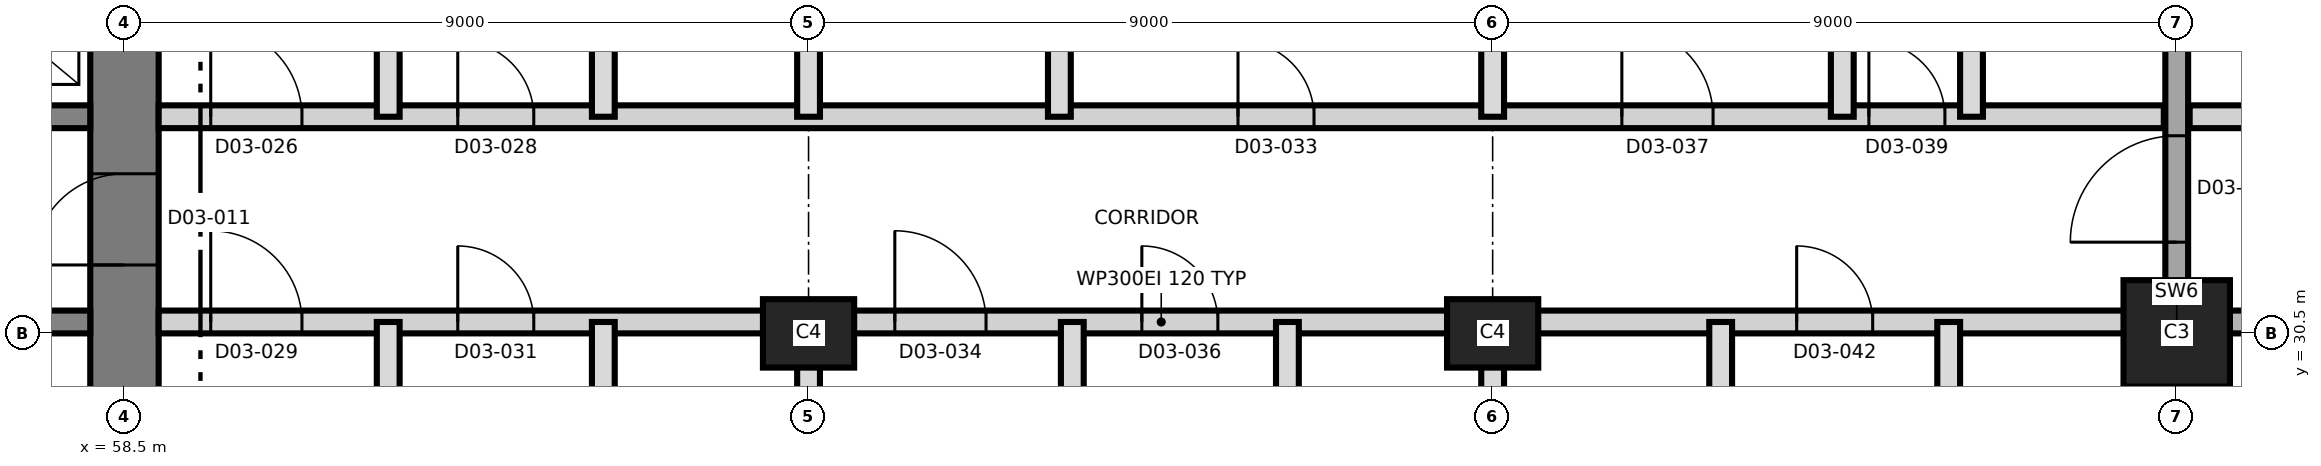
"""IFC4 building model, lengths in metres.
Left out: names, types, materials, properties, quantities, classifications, styles, units other than length and angle.
Written with IfcOpenShell. Run it as: python <this file> out.ifc"""

import sys

from ifc_helpers import new_model, si_unit, direction, frame, frame_2d, origin, origin_2d, place, context, subcontext, project, spatial, rectangle, extrude, element, fill, save


model = new_model("IFC4")
c1 = context("Model", 3, precision=1e-05, world=origin(), true_north=direction((0.0, 1.0)))
c2 = subcontext(c1, "Body", "Model", "MODEL_VIEW")
j1 = project(units=[si_unit("LENGTHUNIT", "METRE"), si_unit("PLANEANGLEUNIT", "RADIAN")], contexts=[c1])
p1 = place(None, origin())
s1 = spatial("IfcSite", under=j1, at=p1, CompositionType="ELEMENT")
p2 = place(p1, origin())
s2 = spatial("IfcBuilding", under=s1, at=p2, CompositionType="ELEMENT")
p3 = place(p2, frame((0.0, 0.0, 59.4)))
s3 = spatial("IfcBuildingStorey", under=s2, at=p3, CompositionType="ELEMENT", Elevation=59.4)
p4 = place(p3, frame((58.5, 21.05, 0.0), z_axis=(0.0, 0.0, 1.0), x_axis=(0.0, 1.0, 0.0)))
e1 = element("IfcWall", 1, at=p4, inside=s3, PredefinedType="SHEAR", context=c2, shape_type="SweptSolid", body=[
    extrude(rectangle(XDim=18.9, YDim=0.9, at=frame_2d((9.45, 0.0))), origin(), (0.0, 0.0, 1.0), 3.7),
])
p5 = place(p4, frame((10.35, 0.0, 0.0)))
e2 = element("IfcOpeningElement", 2, at=p5, cuts=e1, PredefinedType="OPENING", context=c2, shape_type="SweptSolid", body=[
    extrude(rectangle(XDim=1.2, YDim=2.1, at=frame_2d((0.6, 1.05))), frame((0.0, 0.46, 0.0), z_axis=(0.0, -1.0, 0.0), x_axis=(1.0, 0.0, 0.0)), (0.0, 0.0, 1.0), 0.92),
])
p6 = place(p3, frame((31.95, 30.65, 0.0), z_axis=(0.0, 0.0, 1.0), x_axis=(1.0, 0.0, 0.0)))
e3 = element("IfcWall", 3, at=p6, inside=s3, PredefinedType="SHEAR", context=c2, shape_type="SweptSolid", body=[
    extrude(rectangle(XDim=26.1, YDim=0.3, at=frame_2d((13.05, 0.0))), origin(), (0.0, 0.0, 1.0), 3.7),
])
p7 = place(p6, frame((24.55, 0.0, 0.0)))
e4 = element("IfcOpeningElement", 4, at=p7, cuts=e3, PredefinedType="OPENING", context=c2, shape_type="SweptSolid", body=[
    extrude(rectangle(XDim=1.0, YDim=2.1, at=frame_2d((0.5, 1.05))), frame((0.0, 0.16, 0.0), z_axis=(0.0, -1.0, 0.0), x_axis=(1.0, 0.0, 0.0)), (0.0, 0.0, 1.0), 0.32),
])
p8 = place(p6, frame((11.35, 0.0, 0.0)))
e5 = element("IfcOpeningElement", 5, at=p8, cuts=e3, PredefinedType="OPENING", context=c2, shape_type="SweptSolid", body=[
    extrude(rectangle(XDim=1.0, YDim=2.1, at=frame_2d((0.5, 1.05))), frame((0.0, 0.16, 0.0), z_axis=(0.0, -1.0, 0.0), x_axis=(1.0, 0.0, 0.0)), (0.0, 0.0, 1.0), 0.32),
])
p9 = place(p3, frame((31.95, 33.35, 0.0), z_axis=(0.0, 0.0, 1.0), x_axis=(1.0, 0.0, 0.0)))
e6 = element("IfcWall", 6, at=p9, inside=s3, PredefinedType="SHEAR", context=c2, shape_type="SweptSolid", body=[
    extrude(rectangle(XDim=26.1, YDim=0.3, at=frame_2d((13.05, 0.0))), origin(), (0.0, 0.0, 1.0), 3.7),
])
p10 = place(p9, frame((13.125, 0.0, 0.0)))
e7 = element("IfcOpeningElement", 7, at=p10, cuts=e6, PredefinedType="OPENING", context=c2, shape_type="SweptSolid", body=[
    extrude(rectangle(XDim=1.4, YDim=2.1, at=frame_2d((0.7, 1.05))), frame((0.0, 0.16, 0.0), z_axis=(0.0, -1.0, 0.0), x_axis=(1.0, 0.0, 0.0)), (0.0, 0.0, 1.0), 0.32),
])
p11 = place(p9, frame((5.175, 0.0, 0.0)))
e8 = element("IfcOpeningElement", 8, at=p11, cuts=e6, PredefinedType="OPENING", context=c2, shape_type="SweptSolid", body=[
    extrude(rectangle(XDim=1.2, YDim=2.1, at=frame_2d((0.6, 1.05))), frame((0.0, 0.16, 0.0), z_axis=(0.0, -1.0, 0.0), x_axis=(1.0, 0.0, 0.0)), (0.0, 0.0, 1.0), 0.32),
])
p12 = place(p9, frame((19.725, 0.0, 0.0)))
e9 = element("IfcOpeningElement", 9, at=p12, cuts=e6, PredefinedType="OPENING", context=c2, shape_type="SweptSolid", body=[
    extrude(rectangle(XDim=1.2, YDim=2.1, at=frame_2d((0.6, 1.05))), frame((0.0, 0.16, 0.0), z_axis=(0.0, -1.0, 0.0), x_axis=(1.0, 0.0, 0.0)), (0.0, 0.0, 1.0), 0.32),
])
for number, where, z_axis, x_axis in (
    (10, (67.5, 30.5, 0.0), (0.0, 0.0, 1.0), (1.0, 0.0, 0.0)),
    (11, (76.5, 30.5, 0.0), (0.0, 0.0, 1.0), (1.0, 0.0, 0.0)),
):
    element("IfcColumn", number, at=place(p3, frame(where, z_axis=z_axis, x_axis=x_axis)), inside=s3, PredefinedType="COLUMN", context=c2, shape_type="SweptSolid", body=[
        extrude(rectangle(XDim=1.2, YDim=0.9, at=origin_2d()), origin(), (0.0, 0.0, 1.0), 3.7),
    ])
p13 = place(p3, frame((85.5, 30.5, 0.0), z_axis=(0.0, 0.0, 1.0), x_axis=(1.0, 0.0, 0.0)))
e12 = element("IfcColumn", 12, at=p13, inside=s3, PredefinedType="COLUMN", context=c2, shape_type="SweptSolid", body=[
    extrude(rectangle(XDim=1.4, YDim=1.4, at=origin_2d()), origin(), (0.0, 0.0, 1.0), 3.7),
])
p14 = place(p3, frame((85.5, 19.705, 0.0), z_axis=(0.0, 0.0, 1.0), x_axis=(0.0, 1.0, 0.0)))
e13 = element("IfcWall", 13, at=p14, inside=s3, PredefinedType="SHEAR", context=c2, shape_type="SweptSolid", body=[
    extrude(rectangle(XDim=21.59, YDim=0.3, at=frame_2d((10.795, 0.0))), origin(), (0.0, 0.0, 1.0), 3.7),
])
p15 = place(p14, frame((11.995, 0.0, 0.0)))
e14 = element("IfcOpeningElement", 14, at=p15, cuts=e13, PredefinedType="OPENING", context=c2, shape_type="SweptSolid", body=[
    extrude(rectangle(XDim=1.4, YDim=2.1, at=frame_2d((0.7, 1.05))), frame((0.0, 0.16, 0.0), z_axis=(0.0, -1.0, 0.0), x_axis=(1.0, 0.0, 0.0)), (0.0, 0.0, 1.0), 0.32),
])
p16 = place(p3, frame((58.95, 30.65, 0.0), z_axis=(0.0, 0.0, 1.0), x_axis=(1.0, 0.0, 0.0)))
e15 = element("IfcWall", 15, at=p16, inside=s3, PredefinedType="PARTITIONING", context=c2, shape_type="SweptSolid", body=[
    extrude(rectangle(XDim=26.38, YDim=0.3, at=frame_2d((13.19, 0.0))), origin(), (0.0, 0.0, 1.0), 3.4),
])
p17 = place(p16, frame((0.685, 0.0, 0.0)))
e16 = element("IfcOpeningElement", 16, at=p17, cuts=e15, PredefinedType="OPENING", context=c2, shape_type="SweptSolid", body=[
    extrude(rectangle(XDim=1.2, YDim=2.1, at=frame_2d((0.6, 1.05))), frame((0.0, 0.16, 0.0), z_axis=(0.0, -1.0, 0.0), x_axis=(1.0, 0.0, 0.0)), (0.0, 0.0, 1.0), 0.32),
])
p18 = place(p16, frame((3.935, 0.0, 0.0)))
e17 = element("IfcOpeningElement", 17, at=p18, cuts=e15, PredefinedType="OPENING", context=c2, shape_type="SweptSolid", body=[
    extrude(rectangle(XDim=1.0, YDim=2.1, at=frame_2d((0.5, 1.05))), frame((0.0, 0.16, 0.0), z_axis=(0.0, -1.0, 0.0), x_axis=(1.0, 0.0, 0.0)), (0.0, 0.0, 1.0), 0.32),
])
p19 = place(p16, frame((9.685, 0.0, 0.0)))
e18 = element("IfcOpeningElement", 18, at=p19, cuts=e15, PredefinedType="OPENING", context=c2, shape_type="SweptSolid", body=[
    extrude(rectangle(XDim=1.2, YDim=2.1, at=frame_2d((0.6, 1.05))), frame((0.0, 0.16, 0.0), z_axis=(0.0, -1.0, 0.0), x_axis=(1.0, 0.0, 0.0)), (0.0, 0.0, 1.0), 0.32),
])
p20 = place(p16, frame((12.935, 0.0, 0.0)))
e19 = element("IfcOpeningElement", 19, at=p20, cuts=e15, PredefinedType="OPENING", context=c2, shape_type="SweptSolid", body=[
    extrude(rectangle(XDim=1.0, YDim=2.1, at=frame_2d((0.5, 1.05))), frame((0.0, 0.16, 0.0), z_axis=(0.0, -1.0, 0.0), x_axis=(1.0, 0.0, 0.0)), (0.0, 0.0, 1.0), 0.32),
])
p21 = place(p16, frame((21.55, 0.0, 0.0)))
e20 = element("IfcOpeningElement", 20, at=p21, cuts=e15, PredefinedType="OPENING", context=c2, shape_type="SweptSolid", body=[
    extrude(rectangle(XDim=1.0, YDim=2.4, at=frame_2d((0.5, 1.2))), frame((0.0, 0.16, 0.0), z_axis=(0.0, -1.0, 0.0), x_axis=(1.0, 0.0, 0.0)), (0.0, 0.0, 1.0), 0.32),
])
p22 = place(p3, frame((85.67, 30.65, 0.0), z_axis=(0.0, 0.0, 1.0), x_axis=(1.0, 0.0, 0.0)))
e21 = element("IfcWall", 21, at=p22, inside=s3, PredefinedType="SHEAR", context=c2, shape_type="SweptSolid", body=[
    extrude(rectangle(XDim=9.58, YDim=0.3, at=frame_2d((4.79, 0.0))), origin(), (0.0, 0.0, 1.0), 3.4),
])
p23 = place(p22, frame((2.08, 0.0, 0.0)))
e22 = element("IfcOpeningElement", 22, at=p23, cuts=e21, PredefinedType="OPENING", context=c2, shape_type="SweptSolid", body=[
    extrude(rectangle(XDim=1.2, YDim=2.1, at=frame_2d((0.6, 1.05))), frame((0.0, 0.16, 0.0), z_axis=(0.0, -1.0, 0.0), x_axis=(1.0, 0.0, 0.0)), (0.0, 0.0, 1.0), 0.32),
])
p24 = place(p22, frame((5.63, 0.0, 0.0)))
e23 = element("IfcOpeningElement", 23, at=p24, cuts=e21, PredefinedType="OPENING", context=c2, shape_type="SweptSolid", body=[
    extrude(rectangle(XDim=1.0, YDim=2.1, at=frame_2d((0.5, 1.05))), frame((0.0, 0.16, 0.0), z_axis=(0.0, -1.0, 0.0), x_axis=(1.0, 0.0, 0.0)), (0.0, 0.0, 1.0), 0.32),
])
p25 = place(p3, frame((58.95, 33.35, 0.0), z_axis=(0.0, 0.0, 1.0), x_axis=(1.0, 0.0, 0.0)))
e24 = element("IfcWall", 24, at=p25, inside=s3, PredefinedType="PARTITIONING", context=c2, shape_type="SweptSolid", body=[
    extrude(rectangle(XDim=26.38, YDim=0.3, at=frame_2d((13.19, 0.0))), origin(), (0.0, 0.0, 1.0), 3.4),
])
p26 = place(p25, frame((0.685, 0.0, 0.0)))
e25 = element("IfcOpeningElement", 25, at=p26, cuts=e24, PredefinedType="OPENING", context=c2, shape_type="SweptSolid", body=[
    extrude(rectangle(XDim=1.2, YDim=2.1, at=frame_2d((0.6, 1.05))), frame((0.0, 0.16, 0.0), z_axis=(0.0, -1.0, 0.0), x_axis=(1.0, 0.0, 0.0)), (0.0, 0.0, 1.0), 0.32),
])
p27 = place(p25, frame((3.935, 0.0, 0.0)))
e26 = element("IfcOpeningElement", 26, at=p27, cuts=e24, PredefinedType="OPENING", context=c2, shape_type="SweptSolid", body=[
    extrude(rectangle(XDim=1.0, YDim=2.1, at=frame_2d((0.5, 1.05))), frame((0.0, 0.16, 0.0), z_axis=(0.0, -1.0, 0.0), x_axis=(1.0, 0.0, 0.0)), (0.0, 0.0, 1.0), 0.32),
])
p28 = place(p25, frame((14.2, 0.0, 0.0)))
e27 = element("IfcOpeningElement", 27, at=p28, cuts=e24, PredefinedType="OPENING", context=c2, shape_type="SweptSolid", body=[
    extrude(rectangle(XDim=1.0, YDim=2.4, at=frame_2d((0.5, 1.2))), frame((0.0, 0.16, 0.0), z_axis=(0.0, -1.0, 0.0), x_axis=(1.0, 0.0, 0.0)), (0.0, 0.0, 1.0), 0.32),
])
p29 = place(p25, frame((19.25, 0.0, 0.0)))
e28 = element("IfcOpeningElement", 28, at=p29, cuts=e24, PredefinedType="OPENING", context=c2, shape_type="SweptSolid", body=[
    extrude(rectangle(XDim=1.2, YDim=2.1, at=frame_2d((0.6, 1.05))), frame((0.0, 0.16, 0.0), z_axis=(0.0, -1.0, 0.0), x_axis=(1.0, 0.0, 0.0)), (0.0, 0.0, 1.0), 0.32),
])
p30 = place(p25, frame((22.5, 0.0, 0.0)))
e29 = element("IfcOpeningElement", 29, at=p30, cuts=e24, PredefinedType="OPENING", context=c2, shape_type="SweptSolid", body=[
    extrude(rectangle(XDim=1.0, YDim=2.1, at=frame_2d((0.5, 1.05))), frame((0.0, 0.16, 0.0), z_axis=(0.0, -1.0, 0.0), x_axis=(1.0, 0.0, 0.0)), (0.0, 0.0, 1.0), 0.32),
])
p31 = place(p3, frame((85.67, 33.35, 0.0), z_axis=(0.0, 0.0, 1.0), x_axis=(1.0, 0.0, 0.0)))
e30 = element("IfcWall", 30, at=p31, inside=s3, PredefinedType="PARTITIONING", context=c2, shape_type="SweptSolid", body=[
    extrude(rectangle(XDim=9.58, YDim=0.3, at=frame_2d((4.79, 0.0))), origin(), (0.0, 0.0, 1.0), 3.4),
])
p32 = place(p31, frame((1.83, 0.0, 0.0)))
e31 = element("IfcOpeningElement", 31, at=p32, cuts=e30, PredefinedType="OPENING", context=c2, shape_type="SweptSolid", body=[
    extrude(rectangle(XDim=1.0, YDim=2.1, at=frame_2d((0.5, 1.05))), frame((0.0, 0.16, 0.0), z_axis=(0.0, -1.0, 0.0), x_axis=(1.0, 0.0, 0.0)), (0.0, 0.0, 1.0), 0.32),
])
p33 = place(p31, frame((5.63, 0.0, 0.0)))
e32 = element("IfcOpeningElement", 32, at=p33, cuts=e30, PredefinedType="OPENING", context=c2, shape_type="SweptSolid", body=[
    extrude(rectangle(XDim=1.0, YDim=2.1, at=frame_2d((0.5, 1.05))), frame((0.0, 0.16, 0.0), z_axis=(0.0, -1.0, 0.0), x_axis=(1.0, 0.0, 0.0)), (0.0, 0.0, 1.0), 0.32),
])
p34 = place(p3, frame((61.97, 19.705, 0.0), z_axis=(0.0, 0.0, 1.0), x_axis=(0.0, 1.0, 0.0)))
e33 = element("IfcWall", 33, at=p34, inside=s3, PredefinedType="PARTITIONING", context=c2, shape_type="SweptSolid", body=[
    extrude(rectangle(XDim=10.945, YDim=0.3, at=frame_2d((5.472, 0.0))), origin(), (0.0, 0.0, 1.0), 3.4),
])
p35 = place(p3, frame((61.97, 33.35, 0.0), z_axis=(0.0, 0.0, 1.0), x_axis=(0.0, 1.0, 0.0)))
e34 = element("IfcWall", 34, at=p35, inside=s3, PredefinedType="PARTITIONING", context=c2, shape_type="SweptSolid", body=[
    extrude(rectangle(XDim=8.125, YDim=0.3, at=frame_2d((4.062, 0.0))), origin(), (0.0, 0.0, 1.0), 3.4),
])
for number, where, z_axis, x_axis in (
    (35, (64.8, 27.45, 0.0), (0.0, 0.0, 1.0), (0.0, 1.0, 0.0)),
    (36, (64.8, 33.35, 0.0), (0.0, 0.0, 1.0), (0.0, 1.0, 0.0)),
):
    element("IfcWall", number, at=place(p3, frame(where, z_axis=z_axis, x_axis=x_axis)), inside=s3, PredefinedType="PARTITIONING", context=c2, shape_type="SweptSolid", body=[
        extrude(rectangle(XDim=3.2, YDim=0.3, at=frame_2d((1.6, 0.0))), origin(), (0.0, 0.0, 1.0), 3.4),
    ])
p36 = place(p3, frame((67.5, 19.705, 0.0), z_axis=(0.0, 0.0, 1.0), x_axis=(0.0, 1.0, 0.0)))
e37 = element("IfcWall", 37, at=p36, inside=s3, PredefinedType="PARTITIONING", context=c2, shape_type="SweptSolid", body=[
    extrude(rectangle(XDim=10.945, YDim=0.3, at=frame_2d((5.472, 0.0))), origin(), (0.0, 0.0, 1.0), 3.4),
])
p37 = place(p3, frame((67.5, 33.35, 0.0), z_axis=(0.0, 0.0, 1.0), x_axis=(0.0, 1.0, 0.0)))
e38 = element("IfcWall", 38, at=p37, inside=s3, PredefinedType="PARTITIONING", context=c2, shape_type="SweptSolid", body=[
    extrude(rectangle(XDim=8.125, YDim=0.3, at=frame_2d((4.062, 0.0))), origin(), (0.0, 0.0, 1.0), 3.4),
])
p38 = place(p3, frame((70.8, 33.35, 0.0), z_axis=(0.0, 0.0, 1.0), x_axis=(0.0, 1.0, 0.0)))
e39 = element("IfcWall", 39, at=p38, inside=s3, PredefinedType="PARTITIONING", context=c2, shape_type="SweptSolid", body=[
    extrude(rectangle(XDim=3.5, YDim=0.3, at=frame_2d((1.75, 0.0))), origin(), (0.0, 0.0, 1.0), 3.4),
])
p39 = place(p3, frame((70.97, 19.705, 0.0), z_axis=(0.0, 0.0, 1.0), x_axis=(0.0, 1.0, 0.0)))
e40 = element("IfcWall", 40, at=p39, inside=s3, PredefinedType="PARTITIONING", context=c2, shape_type="SweptSolid", body=[
    extrude(rectangle(XDim=10.945, YDim=0.3, at=frame_2d((5.472, 0.0))), origin(), (0.0, 0.0, 1.0), 3.4),
])
p40 = place(p3, frame((73.8, 27.45, 0.0), z_axis=(0.0, 0.0, 1.0), x_axis=(0.0, 1.0, 0.0)))
e41 = element("IfcWall", 41, at=p40, inside=s3, PredefinedType="PARTITIONING", context=c2, shape_type="SweptSolid", body=[
    extrude(rectangle(XDim=3.2, YDim=0.3, at=frame_2d((1.6, 0.0))), origin(), (0.0, 0.0, 1.0), 3.4),
])
p41 = place(p3, frame((76.5, 19.705, 0.0), z_axis=(0.0, 0.0, 1.0), x_axis=(0.0, 1.0, 0.0)))
e42 = element("IfcWall", 42, at=p41, inside=s3, PredefinedType="PARTITIONING", context=c2, shape_type="SweptSolid", body=[
    extrude(rectangle(XDim=10.945, YDim=0.3, at=frame_2d((5.472, 0.0))), origin(), (0.0, 0.0, 1.0), 3.4),
])
p42 = place(p3, frame((76.5, 33.35, 0.0), z_axis=(0.0, 0.0, 1.0), x_axis=(0.0, 1.0, 0.0)))
e43 = element("IfcWall", 43, at=p42, inside=s3, PredefinedType="PARTITIONING", context=c2, shape_type="SweptSolid", body=[
    extrude(rectangle(XDim=8.125, YDim=0.3, at=frame_2d((4.062, 0.0))), origin(), (0.0, 0.0, 1.0), 3.4),
])
p43 = place(p3, frame((79.5, 27.35, 0.0), z_axis=(0.0, 0.0, 1.0), x_axis=(0.0, 1.0, 0.0)))
e44 = element("IfcWall", 44, at=p43, inside=s3, PredefinedType="PARTITIONING", context=c2, shape_type="SweptSolid", body=[
    extrude(rectangle(XDim=3.3, YDim=0.3, at=frame_2d((1.65, 0.0))), origin(), (0.0, 0.0, 1.0), 3.4),
])
p44 = place(p3, frame((81.1, 33.35, 0.0), z_axis=(0.0, 0.0, 1.0), x_axis=(0.0, 1.0, 0.0)))
e45 = element("IfcWall", 45, at=p44, inside=s3, PredefinedType="PARTITIONING", context=c2, shape_type="SweptSolid", body=[
    extrude(rectangle(XDim=8.125, YDim=0.3, at=frame_2d((4.062, 0.0))), origin(), (0.0, 0.0, 1.0), 3.4),
])
p45 = place(p3, frame((82.5, 27.35, 0.0), z_axis=(0.0, 0.0, 1.0), x_axis=(0.0, 1.0, 0.0)))
e46 = element("IfcWall", 46, at=p45, inside=s3, PredefinedType="PARTITIONING", context=c2, shape_type="SweptSolid", body=[
    extrude(rectangle(XDim=3.3, YDim=0.3, at=frame_2d((1.65, 0.0))), origin(), (0.0, 0.0, 1.0), 3.4),
])
p46 = place(p3, frame((82.8, 33.35, 0.0), z_axis=(0.0, 0.0, 1.0), x_axis=(0.0, 1.0, 0.0)))
e47 = element("IfcWall", 47, at=p46, inside=s3, PredefinedType="PARTITIONING", context=c2, shape_type="SweptSolid", body=[
    extrude(rectangle(XDim=3.2, YDim=0.3, at=frame_2d((1.6, 0.0))), origin(), (0.0, 0.0, 1.0), 3.4),
])
p47 = place(p5, origin())
e48 = element("IfcDoor", 48, at=p47, inside=s3, OperationType="SINGLE_SWING_LEFT", PredefinedType="DOOR", context=c2, shape_type="SweptSolid", body=[
    extrude(rectangle(XDim=1.2, YDim=2.1, at=frame_2d((0.6, 1.05))), frame((0.0, 0.025, 0.0), z_axis=(0.0, -1.0, 0.0), x_axis=(1.0, 0.0, 0.0)), (0.0, 0.0, 1.0), 0.05),
])
fill(e2, e48)
p48 = place(p26, origin())
e49 = element("IfcDoor", 49, at=p48, inside=s3, OperationType="SINGLE_SWING_LEFT", PredefinedType="DOOR", context=c2, shape_type="SweptSolid", body=[
    extrude(rectangle(XDim=1.2, YDim=2.1, at=frame_2d((0.6, 1.05))), frame((0.0, 0.025, 0.0), z_axis=(0.0, -1.0, 0.0), x_axis=(1.0, 0.0, 0.0)), (0.0, 0.0, 1.0), 0.05),
])
fill(e25, e49)
p49 = place(p27, origin())
e50 = element("IfcDoor", 50, at=p49, inside=s3, OperationType="SINGLE_SWING_LEFT", PredefinedType="DOOR", context=c2, shape_type="SweptSolid", body=[
    extrude(rectangle(XDim=1.0, YDim=2.1, at=frame_2d((0.5, 1.05))), frame((0.0, 0.025, 0.0), z_axis=(0.0, -1.0, 0.0), x_axis=(1.0, 0.0, 0.0)), (0.0, 0.0, 1.0), 0.05),
])
fill(e26, e50)
p50 = place(p17, origin())
e51 = element("IfcDoor", 51, at=p50, inside=s3, OperationType="SINGLE_SWING_LEFT", PredefinedType="DOOR", context=c2, shape_type="SweptSolid", body=[
    extrude(rectangle(XDim=1.2, YDim=2.1, at=frame_2d((0.6, 1.05))), frame((0.0, 0.025, 0.0), z_axis=(0.0, -1.0, 0.0), x_axis=(1.0, 0.0, 0.0)), (0.0, 0.0, 1.0), 0.05),
])
fill(e16, e51)
p51 = place(p18, origin())
e52 = element("IfcDoor", 52, at=p51, inside=s3, OperationType="SINGLE_SWING_LEFT", PredefinedType="DOOR", context=c2, shape_type="SweptSolid", body=[
    extrude(rectangle(XDim=1.0, YDim=2.1, at=frame_2d((0.5, 1.05))), frame((0.0, 0.025, 0.0), z_axis=(0.0, -1.0, 0.0), x_axis=(1.0, 0.0, 0.0)), (0.0, 0.0, 1.0), 0.05),
])
fill(e17, e52)
p52 = place(p28, origin())
e53 = element("IfcDoor", 53, at=p52, inside=s3, OperationType="SINGLE_SWING_LEFT", PredefinedType="DOOR", context=c2, shape_type="SweptSolid", body=[
    extrude(rectangle(XDim=1.0, YDim=2.4, at=frame_2d((0.5, 1.2))), frame((0.0, 0.025, 0.0), z_axis=(0.0, -1.0, 0.0), x_axis=(1.0, 0.0, 0.0)), (0.0, 0.0, 1.0), 0.05),
])
fill(e27, e53)
p53 = place(p19, origin())
e54 = element("IfcDoor", 54, at=p53, inside=s3, OperationType="SINGLE_SWING_RIGHT", PredefinedType="DOOR", context=c2, shape_type="SweptSolid", body=[
    extrude(rectangle(XDim=1.2, YDim=2.1, at=frame_2d((0.6, 1.05))), frame((0.0, 0.025, 0.0), z_axis=(0.0, -1.0, 0.0), x_axis=(1.0, 0.0, 0.0)), (0.0, 0.0, 1.0), 0.05),
])
fill(e18, e54)
p54 = place(p20, origin())
e55 = element("IfcDoor", 55, at=p54, inside=s3, OperationType="SINGLE_SWING_LEFT", PredefinedType="DOOR", context=c2, shape_type="SweptSolid", body=[
    extrude(rectangle(XDim=1.0, YDim=2.1, at=frame_2d((0.5, 1.05))), frame((0.0, 0.025, 0.0), z_axis=(0.0, -1.0, 0.0), x_axis=(1.0, 0.0, 0.0)), (0.0, 0.0, 1.0), 0.05),
])
fill(e19, e55)
p55 = place(p29, origin())
e56 = element("IfcDoor", 56, at=p55, inside=s3, OperationType="SINGLE_SWING_RIGHT", PredefinedType="DOOR", context=c2, shape_type="SweptSolid", body=[
    extrude(rectangle(XDim=1.2, YDim=2.1, at=frame_2d((0.6, 1.05))), frame((0.0, 0.025, 0.0), z_axis=(0.0, -1.0, 0.0), x_axis=(1.0, 0.0, 0.0)), (0.0, 0.0, 1.0), 0.05),
])
fill(e28, e56)
p56 = place(p30, origin())
e57 = element("IfcDoor", 57, at=p56, inside=s3, OperationType="SINGLE_SWING_LEFT", PredefinedType="DOOR", context=c2, shape_type="SweptSolid", body=[
    extrude(rectangle(XDim=1.0, YDim=2.1, at=frame_2d((0.5, 1.05))), frame((0.0, 0.025, 0.0), z_axis=(0.0, -1.0, 0.0), x_axis=(1.0, 0.0, 0.0)), (0.0, 0.0, 1.0), 0.05),
])
fill(e29, e57)
p57 = place(p21, origin())
e58 = element("IfcDoor", 58, at=p57, inside=s3, OperationType="SINGLE_SWING_RIGHT", PredefinedType="DOOR", context=c2, shape_type="SweptSolid", body=[
    extrude(rectangle(XDim=1.0, YDim=2.4, at=frame_2d((0.5, 1.2))), frame((0.0, 0.025, 0.0), z_axis=(0.0, -1.0, 0.0), x_axis=(1.0, 0.0, 0.0)), (0.0, 0.0, 1.0), 0.05),
])
fill(e20, e58)
p58 = place(p15, origin())
e59 = element("IfcDoor", 59, at=p58, inside=s3, OperationType="SINGLE_SWING_RIGHT", PredefinedType="DOOR", context=c2, shape_type="SweptSolid", body=[
    extrude(rectangle(XDim=1.4, YDim=2.1, at=frame_2d((0.7, 1.05))), frame((0.0, 0.025, 0.0), z_axis=(0.0, -1.0, 0.0), x_axis=(1.0, 0.0, 0.0)), (0.0, 0.0, 1.0), 0.05),
])
fill(e14, e59)
save(model, sys.argv[1])
